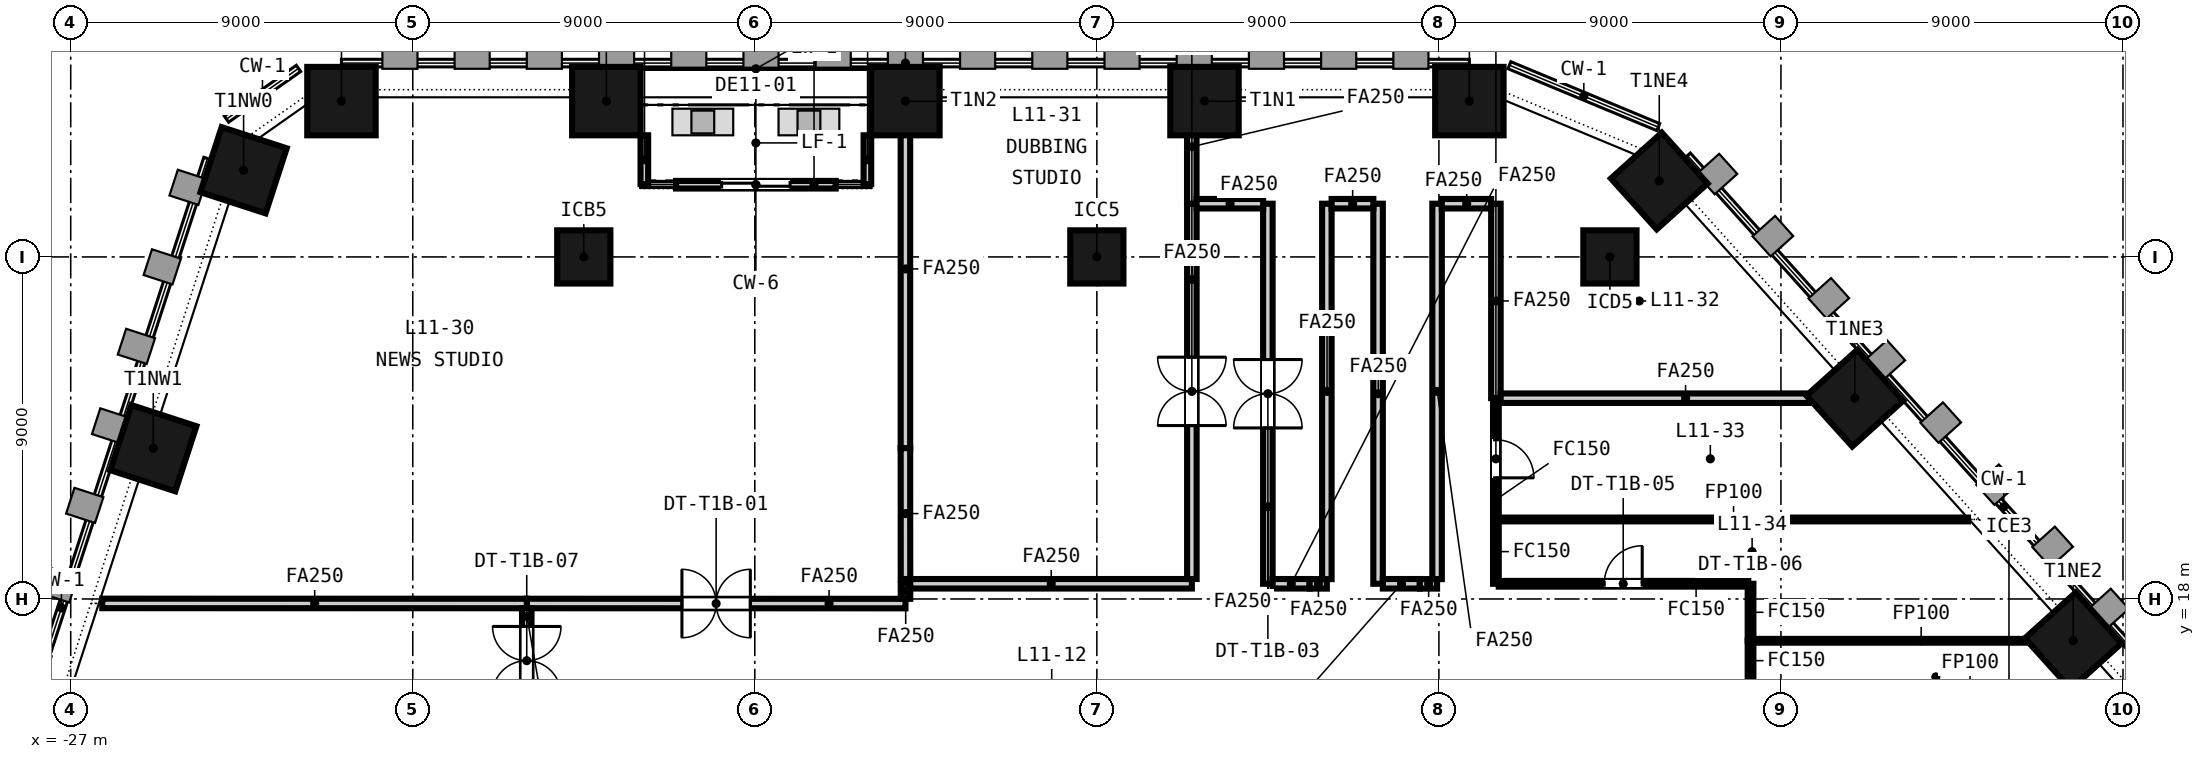
"""IFC4 building model, lengths in metres.
Left out: names, types, materials, properties, quantities, classifications, styles, units other than length and angle.
Written with IfcOpenShell. Run it as: python <this file> out.ifc"""

import sys

from ifc_helpers import new_model, si_unit, direction, frame, frame_2d, origin, origin_2d, place, context, subcontext, project, spatial, rectangle, extrude, element, fill, save


model = new_model("IFC4")
c1 = context("Model", 3, precision=1e-05, world=origin(), true_north=direction((0.0, 1.0)))
c2 = subcontext(c1, "Body", "Model", "MODEL_VIEW")
j1 = project(units=[si_unit("LENGTHUNIT", "METRE"), si_unit("PLANEANGLEUNIT", "RADIAN")], contexts=[c1])
p1 = place(None, origin())
s1 = spatial("IfcSite", under=j1, at=p1, CompositionType="ELEMENT")
p2 = place(p1, origin())
s2 = spatial("IfcBuilding", under=s1, at=p2, CompositionType="ELEMENT")
p3 = place(p2, frame((0.0, 0.0, 54.25)))
s3 = spatial("IfcBuildingStorey", under=s2, at=p3, CompositionType="ELEMENT", Elevation=54.25)
for number, where, z_axis, x_axis in (
    (1, (9.802, 31.1, -0.15), (0.0, 0.0, 1.0), (-1.0, 0.0, 0.0)),
    (2, (2.832, 31.1, -0.15), (0.0, 0.0, 1.0), (-1.0, 0.0, 0.0)),
    (3, (-5.037, 31.1, -0.15), (0.0, 0.0, 1.0), (-1.0, 0.0, 0.0)),
    (4, (-12.907, 31.1, -0.15), (0.0, 0.0, 1.0), (-1.0, 0.0, 0.0)),
    (5, (-19.876, 31.1, -0.15), (0.0, 0.0, 1.0), (-1.0, 0.0, 0.0)),
    (6, (-22.451, 29.281, -0.15), (0.0, 0.0, 1.0), (-0.309, -0.951, 0.0)),
    (7, (-24.827, 21.968, -0.15), (0.0, 0.0, 1.0), (-0.309, -0.951, 0.0)),
    (8, (25.691, 16.9, -0.15), (0.0, 0.0, 1.0), (-0.669, 0.743, 0.0)),
    (9, (19.944, 23.283, -0.15), (0.0, 0.0, 1.0), (-0.669, 0.743, 0.0)),
    (10, (14.799, 28.998, -0.15), (0.0, 0.0, 1.0), (-0.669, 0.743, 0.0)),
):
    element("IfcColumn", number, at=place(p3, frame(where, z_axis=z_axis, x_axis=x_axis)), inside=s3, PredefinedType="COLUMN", context=c2, shape_type="SweptSolid", body=[
        extrude(rectangle(XDim=1.8, YDim=1.8, at=origin_2d()), origin(), (0.0, 0.0, 1.0), 3.65),
    ])
for number, where, z_axis, x_axis in (
    (11, (-13.5, 27.0, -0.15), (0.0, 0.0, 1.0), (1.0, 0.0, 0.0)),
    (12, (0.0, 27.0, -0.15), (0.0, 0.0, 1.0), (1.0, 0.0, 0.0)),
    (13, (13.5, 27.0, -0.15), (0.0, 0.0, 1.0), (1.0, 0.0, 0.0)),
):
    element("IfcColumn", number, at=place(p3, frame(where, z_axis=z_axis, x_axis=x_axis)), inside=s3, PredefinedType="COLUMN", context=c2, shape_type="SweptSolid", body=[
        extrude(rectangle(XDim=1.4, YDim=1.4, at=origin_2d()), origin(), (0.0, 0.0, 1.0), 3.65),
    ])
p4 = place(p3, frame((-6.872, 28.9, 0.0), z_axis=(0.0, 0.0, 1.0), x_axis=(-1.0, 0.0, 0.0)))
e14 = element("IfcWall", 14, at=p4, inside=s3, PredefinedType="SOLIDWALL", context=c2, shape_type="SweptSolid", body=[
    extrude(rectangle(XDim=4.2, YDim=0.2, at=frame_2d((2.1, 0.0))), origin(), (0.0, 0.0, 1.0), 3.05),
])
p5 = place(p4, frame((1.2, 0.0, 0.0)))
e15 = element("IfcOpeningElement", 15, at=p5, cuts=e14, PredefinedType="OPENING", context=c2, shape_type="SweptSolid", body=[
    extrude(rectangle(XDim=1.8, YDim=2.4, at=frame_2d((0.9, 1.2))), frame((0.0, 0.11, 0.0), z_axis=(0.0, -1.0, 0.0), x_axis=(1.0, 0.0, 0.0)), (0.0, 0.0, 1.0), 0.22),
])
for number, where, z_axis, x_axis in (
    (16, (-6.037, 30.2, 0.0), (0.0, 0.0, 1.0), (0.0, -1.0, 0.0)),
    (17, (-11.907, 30.2, 0.0), (0.0, 0.0, 1.0), (0.0, -1.0, 0.0)),
):
    element("IfcWall", number, at=place(p3, frame(where, z_axis=z_axis, x_axis=x_axis)), inside=s3, PredefinedType="SOLIDWALL", context=c2, shape_type="SweptSolid", body=[
        extrude(rectangle(XDim=1.284, YDim=0.2, at=frame_2d((0.642, 0.0))), origin(), (0.0, 0.0, 1.0), 3.05),
    ])
p6 = place(p3, frame((4.5, 28.4, 0.0), z_axis=(0.0, 0.0, 1.0), x_axis=(0.0, -1.0, 0.0)))
e18 = element("IfcWall", 18, at=p6, inside=s3, PredefinedType="PARTITIONING", context=c2, shape_type="SweptSolid", body=[
    extrude(rectangle(XDim=10.0, YDim=0.25, at=frame_2d((5.0, 0.0))), origin(), (0.0, 0.0, 1.0), 2.741),
])
p7 = place(p6, frame((4.1, 0.0, 0.0)))
e19 = element("IfcOpeningElement", 19, at=p7, cuts=e18, PredefinedType="OPENING", context=c2, shape_type="SweptSolid", body=[
    extrude(rectangle(XDim=1.8, YDim=2.1, at=frame_2d((0.9, 1.05))), frame((0.0, 0.135, 0.0), z_axis=(0.0, -1.0, 0.0), x_axis=(1.0, 0.0, 0.0)), (0.0, 0.0, 1.0), 0.27),
])
p8 = place(p3, frame((7.4, 28.4, 0.0), z_axis=(0.0, 0.0, 1.0), x_axis=(0.0, -1.0, 0.0)))
e20 = element("IfcWall", 20, at=p8, inside=s3, PredefinedType="PARTITIONING", context=c2, shape_type="SweptSolid", body=[
    extrude(rectangle(XDim=10.0, YDim=0.25, at=frame_2d((5.0, 0.0))), origin(), (0.0, 0.0, 1.0), 2.741),
])
p9 = place(p3, frame((10.5, 28.4, 0.0), z_axis=(0.0, 0.0, 1.0), x_axis=(0.0, -1.0, 0.0)))
e21 = element("IfcWall", 21, at=p9, inside=s3, PredefinedType="PARTITIONING", context=c2, shape_type="SweptSolid", body=[
    extrude(rectangle(XDim=5.117, YDim=0.25, at=frame_2d((2.559, 0.0))), origin(), (0.0, 0.0, 1.0), 2.741),
])
p10 = place(p3, frame((10.5, 23.283, 0.0), z_axis=(0.0, 0.0, 1.0), x_axis=(0.0, -1.0, 0.0)))
e22 = element("IfcWall", 22, at=p10, inside=s3, PredefinedType="PARTITIONING", context=c2, shape_type="SweptSolid", body=[
    extrude(rectangle(XDim=3.191, YDim=0.15, at=frame_2d((1.595, 0.0))), origin(), (0.0, 0.0, 1.0), 2.741),
])
p11 = place(p10, frame((1.095, 0.0, 0.0)))
e23 = element("IfcOpeningElement", 23, at=p11, cuts=e22, PredefinedType="OPENING", context=c2, shape_type="SweptSolid", body=[
    extrude(rectangle(XDim=1.0, YDim=2.1, at=frame_2d((0.5, 1.05))), frame((0.0, 0.085, 0.0), z_axis=(0.0, -1.0, 0.0), x_axis=(1.0, 0.0, 0.0)), (0.0, 0.0, 1.0), 0.17),
])
p12 = place(p3, frame((10.5, 20.092, 0.0), z_axis=(0.0, 0.0, 1.0), x_axis=(0.0, -1.0, 0.0)))
e24 = element("IfcWall", 24, at=p12, inside=s3, PredefinedType="PARTITIONING", context=c2, shape_type="SweptSolid", body=[
    extrude(rectangle(XDim=1.692, YDim=0.15, at=frame_2d((0.846, 0.0))), origin(), (0.0, 0.0, 1.0), 2.741),
])
p13 = place(p3, frame((17.2, 18.4, 0.0), z_axis=(0.0, 0.0, 1.0), x_axis=(0.0, -1.0, 0.0)))
e25 = element("IfcWall", 25, at=p13, inside=s3, PredefinedType="PARTITIONING", context=c2, shape_type="SweptSolid", body=[
    extrude(rectangle(XDim=1.5, YDim=0.15, at=frame_2d((0.75, 0.0))), origin(), (0.0, 0.0, 1.0), 2.741),
])
p14 = place(p3, frame((17.2, 16.9, 0.0), z_axis=(0.0, 0.0, 1.0), x_axis=(0.0, -1.0, 0.0)))
e26 = element("IfcWall", 26, at=p14, inside=s3, PredefinedType="PARTITIONING", context=c2, shape_type="SweptSolid", body=[
    extrude(rectangle(XDim=3.191, YDim=0.15, at=frame_2d((1.595, 0.0))), origin(), (0.0, 0.0, 1.0), 2.741),
])
p15 = place(p14, frame((1.095, 0.0, 0.0)))
e27 = element("IfcOpeningElement", 27, at=p15, cuts=e26, PredefinedType="OPENING", context=c2, shape_type="SweptSolid", body=[
    extrude(rectangle(XDim=1.0, YDim=2.1, at=frame_2d((0.5, 1.05))), frame((0.0, 0.085, 0.0), z_axis=(0.0, -1.0, 0.0), x_axis=(1.0, 0.0, 0.0)), (0.0, 0.0, 1.0), 0.17),
])
p16 = place(p3, frame((-15.0, 17.881, 0.0), z_axis=(0.0, 0.0, 1.0), x_axis=(0.999999975691, -0.000220496356, 0.0)))
e28 = element("IfcWall", 28, at=p16, inside=s3, PredefinedType="PARTITIONING", context=c2, shape_type="SweptSolid", body=[
    extrude(rectangle(XDim=9.965, YDim=0.25, at=frame_2d((4.982, 0.0))), origin(), (0.0, 0.0, 1.0), 2.741),
])
p17 = place(p16, frame((4.083, 0.0, 0.0)))
e29 = element("IfcOpeningElement", 29, at=p17, cuts=e28, PredefinedType="OPENING", context=c2, shape_type="SweptSolid", body=[
    extrude(rectangle(XDim=1.8, YDim=2.1, at=frame_2d((0.9, 1.05))), frame((0.0, 0.135, 0.0), z_axis=(0.0, -1.0, 0.0), x_axis=(1.0, 0.0, 0.0)), (0.0, 0.0, 1.0), 0.27),
])
p18 = place(p3, frame((-5.035, 18.004, 0.0), z_axis=(0.0, 0.0, 1.0), x_axis=(0.0, 1.0, 0.0)))
e30 = element("IfcWall", 30, at=p18, inside=s3, PredefinedType="PARTITIONING", context=c2, shape_type="SweptSolid", body=[
    extrude(rectangle(XDim=0.396, YDim=0.25, at=frame_2d((0.198, 0.0))), origin(), (0.0, 0.0, 1.0), 2.741),
])
p19 = place(p3, frame((-5.037, 21.968, 0.0), z_axis=(0.0, 0.0, 1.0), x_axis=(0.0, 1.0, 0.0)))
e31 = element("IfcWall", 31, at=p19, inside=s3, PredefinedType="PARTITIONING", context=c2, shape_type="SweptSolid", body=[
    extrude(rectangle(XDim=9.432, YDim=0.25, at=frame_2d((4.716, 0.0))), origin(), (0.0, 0.0, 1.0), 2.741),
])
p20 = place(p3, frame((-26.17, 17.883, 0.0), z_axis=(0.0, 0.0, 1.0), x_axis=(0.999999988296, -0.000152998774, 0.0)))
e32 = element("IfcWall", 32, at=p20, inside=s3, PredefinedType="PARTITIONING", context=c2, shape_type="SweptSolid", body=[
    extrude(rectangle(XDim=11.17, YDim=0.25, at=frame_2d((5.585, 0.0))), origin(), (0.0, 0.0, 1.0), 2.741),
])
p21 = place(p3, frame((-4.91, 18.4, 0.0), z_axis=(0.0, 0.0, 1.0), x_axis=(1.0, 0.0, 0.0)))
e33 = element("IfcWall", 33, at=p21, inside=s3, PredefinedType="PARTITIONING", context=c2, shape_type="SweptSolid", body=[
    extrude(rectangle(XDim=7.41, YDim=0.25, at=frame_2d((3.705, 0.0))), origin(), (0.0, 0.0, 1.0), 2.741),
])
p22 = place(p3, frame((2.5, 18.525, 0.0), z_axis=(0.0, 0.0, 1.0), x_axis=(0.0, 1.0, 0.0)))
e34 = element("IfcWall", 34, at=p22, inside=s3, PredefinedType="PARTITIONING", context=c2, shape_type="SweptSolid", body=[
    extrude(rectangle(XDim=9.875, YDim=0.25, at=frame_2d((4.938, 0.0))), origin(), (0.0, 0.0, 1.0), 2.741),
])
p23 = place(p22, frame((4.038, 0.0, 0.0)))
e35 = element("IfcOpeningElement", 35, at=p23, cuts=e34, PredefinedType="OPENING", context=c2, shape_type="SweptSolid", body=[
    extrude(rectangle(XDim=1.8, YDim=2.1, at=frame_2d((0.9, 1.05))), frame((0.0, 0.135, 0.0), z_axis=(0.0, -1.0, 0.0), x_axis=(1.0, 0.0, 0.0)), (0.0, 0.0, 1.0), 0.27),
])
p24 = place(p3, frame((-5.037, 21.968, 0.0), z_axis=(0.0, 0.0, 1.0), x_axis=(0.000567255103, -0.999999839111, 0.0)))
e36 = element("IfcWall", 36, at=p24, inside=s3, PredefinedType="PARTITIONING", context=c2, shape_type="SweptSolid", body=[
    extrude(rectangle(XDim=3.443, YDim=0.25, at=frame_2d((1.722, 0.0))), origin(), (0.0, 0.0, 1.0), 2.741),
])
p25 = place(p3, frame((2.498, 28.4, 0.0), z_axis=(0.0, 0.0, 1.0), x_axis=(0.0, 1.0, 0.0)))
e37 = element("IfcWall", 37, at=p25, inside=s3, PredefinedType="PARTITIONING", context=c2, shape_type="SweptSolid", body=[
    extrude(rectangle(XDim=3.0, YDim=0.25, at=frame_2d((1.5, 0.0))), origin(), (0.0, 0.0, 1.0), 2.741),
])
p26 = place(p3, frame((2.625, 28.4, 0.0), z_axis=(0.0, 0.0, 1.0), x_axis=(1.0, 0.0, 0.0)))
e38 = element("IfcWall", 38, at=p26, inside=s3, PredefinedType="PARTITIONING", context=c2, shape_type="SweptSolid", body=[
    extrude(rectangle(XDim=1.75, YDim=0.25, at=frame_2d((0.875, 0.0))), origin(), (0.0, 0.0, 1.0), 2.741),
])
p27 = place(p3, frame((4.625, 18.4, 0.0), z_axis=(0.0, 0.0, 1.0), x_axis=(1.0, 0.0, 0.0)))
e39 = element("IfcWall", 39, at=p27, inside=s3, PredefinedType="PARTITIONING", context=c2, shape_type="SweptSolid", body=[
    extrude(rectangle(XDim=0.973, YDim=0.25, at=frame_2d((0.486, 0.0))), origin(), (0.0, 0.0, 1.0), 2.741),
])
p28 = place(p3, frame((5.598, 18.398, 0.0), z_axis=(0.0, 0.0, 1.0), x_axis=(1.0, 0.0, 0.0)))
e40 = element("IfcWall", 40, at=p28, inside=s3, PredefinedType="PARTITIONING", context=c2, shape_type="SweptSolid", body=[
    extrude(rectangle(XDim=0.454, YDim=0.25, at=frame_2d((0.227, 0.0))), origin(), (0.0, 0.0, 1.0), 2.741),
])
p29 = place(p3, frame((6.052, 18.523, 0.0), z_axis=(0.0, 0.0, 1.0), x_axis=(0.0, 1.0, 0.0)))
e41 = element("IfcWall", 41, at=p29, inside=s3, PredefinedType="PARTITIONING", context=c2, shape_type="SweptSolid", body=[
    extrude(rectangle(XDim=9.877, YDim=0.25, at=frame_2d((4.938, 0.0))), origin(), (0.0, 0.0, 1.0), 2.741),
])
p30 = place(p3, frame((6.177, 28.4, 0.0), z_axis=(0.0, 0.0, 1.0), x_axis=(1.0, 0.0, 0.0)))
e42 = element("IfcWall", 42, at=p30, inside=s3, PredefinedType="PARTITIONING", context=c2, shape_type="SweptSolid", body=[
    extrude(rectangle(XDim=1.098, YDim=0.25, at=frame_2d((0.549, 0.0))), origin(), (0.0, 0.0, 1.0), 2.741),
])
p31 = place(p3, frame((7.525, 18.4, 0.0), z_axis=(0.0, 0.0, 1.0), x_axis=(1.0, 0.0, 0.0)))
e43 = element("IfcWall", 43, at=p31, inside=s3, PredefinedType="PARTITIONING", context=c2, shape_type="SweptSolid", body=[
    extrude(rectangle(XDim=0.973, YDim=0.25, at=frame_2d((0.487, 0.0))), origin(), (0.0, 0.0, 1.0), 2.741),
])
p32 = place(p3, frame((8.498, 18.398, 0.0), z_axis=(0.0, 0.0, 1.0), x_axis=(1.0, 0.0, 0.0)))
e44 = element("IfcWall", 44, at=p32, inside=s3, PredefinedType="PARTITIONING", context=c2, shape_type="SweptSolid", body=[
    extrude(rectangle(XDim=0.454, YDim=0.25, at=frame_2d((0.227, 0.0))), origin(), (0.0, 0.0, 1.0), 2.741),
])
p33 = place(p3, frame((8.952, 18.523, 0.0), z_axis=(0.0, 0.0, 1.0), x_axis=(0.0, 1.0, 0.0)))
e45 = element("IfcWall", 45, at=p33, inside=s3, PredefinedType="PARTITIONING", context=c2, shape_type="SweptSolid", body=[
    extrude(rectangle(XDim=9.877, YDim=0.25, at=frame_2d((4.938, 0.0))), origin(), (0.0, 0.0, 1.0), 2.741),
])
p34 = place(p3, frame((9.077, 28.4, 0.0), z_axis=(0.0, 0.0, 1.0), x_axis=(1.0, 0.0, 0.0)))
e46 = element("IfcWall", 46, at=p34, inside=s3, PredefinedType="PARTITIONING", context=c2, shape_type="SweptSolid", body=[
    extrude(rectangle(XDim=1.298, YDim=0.25, at=frame_2d((0.649, 0.0))), origin(), (0.0, 0.0, 1.0), 2.741),
])
p35 = place(p3, frame((10.625, 23.283, 0.0), z_axis=(0.0, 0.0, 1.0), x_axis=(1.0, 0.0, 0.0)))
e47 = element("IfcWall", 47, at=p35, inside=s3, PredefinedType="PARTITIONING", context=c2, shape_type="SweptSolid", body=[
    extrude(rectangle(XDim=9.722, YDim=0.25, at=frame_2d((4.861, 0.0))), origin(), (0.0, 0.0, 1.0), 2.741),
])
p36 = place(p3, frame((10.575, 20.092, 0.0), z_axis=(0.0, 0.0, 1.0), x_axis=(1.0, 0.0, 0.0)))
e48 = element("IfcWall", 48, at=p36, inside=s3, PredefinedType="PARTITIONING", context=c2, shape_type="SweptSolid", body=[
    extrude(rectangle(XDim=12.346, YDim=0.1, at=frame_2d((6.173, 0.0))), origin(), (0.0, 0.0, 1.0), 2.741),
])
p37 = place(p3, frame((10.575, 18.4, 0.0), z_axis=(0.0, 0.0, 1.0), x_axis=(1.0, 0.0, 0.0)))
e49 = element("IfcWall", 49, at=p37, inside=s3, PredefinedType="PARTITIONING", context=c2, shape_type="SweptSolid", body=[
    extrude(rectangle(XDim=6.55, YDim=0.15, at=frame_2d((3.275, 0.0))), origin(), (0.0, 0.0, 1.0), 2.741),
])
p38 = place(p37, frame((2.775, 0.0, 0.0)))
e50 = element("IfcOpeningElement", 50, at=p38, cuts=e49, PredefinedType="OPENING", context=c2, shape_type="SweptSolid", body=[
    extrude(rectangle(XDim=1.0, YDim=2.1, at=frame_2d((0.5, 1.05))), frame((0.0, 0.085, 0.0), z_axis=(0.0, -1.0, 0.0), x_axis=(1.0, 0.0, 0.0)), (0.0, 0.0, 1.0), 0.17),
])
p39 = place(p3, frame((17.275, 16.9, 0.0), z_axis=(0.0, 0.0, 1.0), x_axis=(1.0, 0.0, 0.0)))
e51 = element("IfcWall", 51, at=p39, inside=s3, PredefinedType="PARTITIONING", context=c2, shape_type="SweptSolid", body=[
    extrude(rectangle(XDim=8.82, YDim=0.1, at=frame_2d((4.41, 0.0))), origin(), (0.0, 0.0, 1.0), 2.741),
])
p40 = place(p3, frame((-15.002, 14.998, 0.0), z_axis=(0.0, 0.0, 1.0), x_axis=(0.000708152429, 0.99999974926, 0.0)))
e52 = element("IfcWall", 52, at=p40, inside=s3, PredefinedType="PARTITIONING", context=c2, shape_type="SweptSolid", body=[
    extrude(rectangle(XDim=2.758, YDim=0.25, at=frame_2d((1.379, 0.0))), origin(), (0.0, 0.0, 1.0), 2.741),
])
p41 = place(p40, frame((0.479, 0.0, 0.0)))
e53 = element("IfcOpeningElement", 53, at=p41, cuts=e52, PredefinedType="OPENING", context=c2, shape_type="SweptSolid", body=[
    extrude(rectangle(XDim=1.8, YDim=2.1, at=frame_2d((0.9, 1.05))), frame((0.0, 0.135, 0.0), z_axis=(0.0, -1.0, 0.0), x_axis=(1.0, 0.0, 0.0)), (0.0, 0.0, 1.0), 0.27),
])
p42 = place(p5, origin())
e54 = element("IfcDoor", 54, at=p42, inside=s3, OperationType="SINGLE_SWING_LEFT", PredefinedType="DOOR", context=c2, shape_type="SweptSolid", body=[
    extrude(rectangle(XDim=1.8, YDim=2.4, at=frame_2d((0.9, 1.2))), frame((0.0, 0.025, 0.0), z_axis=(0.0, -1.0, 0.0), x_axis=(1.0, 0.0, 0.0)), (0.0, 0.0, 1.0), 0.05),
])
fill(e15, e54)
p43 = place(p17, origin())
e55 = element("IfcDoor", 55, at=p43, inside=s3, OperationType="DOUBLE_DOOR_DOUBLE_SWING", PredefinedType="DOOR", context=c2, shape_type="SweptSolid", body=[
    extrude(rectangle(XDim=1.8, YDim=2.1, at=frame_2d((0.9, 1.05))), frame((0.0, 0.025, 0.0), z_axis=(0.0, -1.0, 0.0), x_axis=(1.0, 0.0, 0.0)), (0.0, 0.0, 1.0), 0.05),
])
fill(e29, e55)
p44 = place(p23, origin())
e56 = element("IfcDoor", 56, at=p44, inside=s3, OperationType="DOUBLE_DOOR_DOUBLE_SWING", PredefinedType="DOOR", context=c2, shape_type="SweptSolid", body=[
    extrude(rectangle(XDim=1.8, YDim=2.1, at=frame_2d((0.9, 1.05))), frame((0.0, 0.025, 0.0), z_axis=(0.0, -1.0, 0.0), x_axis=(1.0, 0.0, 0.0)), (0.0, 0.0, 1.0), 0.05),
])
fill(e35, e56)
p45 = place(p7, origin())
e57 = element("IfcDoor", 57, at=p45, inside=s3, OperationType="DOUBLE_DOOR_DOUBLE_SWING", PredefinedType="DOOR", context=c2, shape_type="SweptSolid", body=[
    extrude(rectangle(XDim=1.8, YDim=2.1, at=frame_2d((0.9, 1.05))), frame((0.0, 0.025, 0.0), z_axis=(0.0, -1.0, 0.0), x_axis=(1.0, 0.0, 0.0)), (0.0, 0.0, 1.0), 0.05),
])
fill(e19, e57)
p46 = place(p11, origin())
e58 = element("IfcDoor", 58, at=p46, inside=s3, OperationType="SINGLE_SWING_RIGHT", PredefinedType="DOOR", context=c2, shape_type="SweptSolid", body=[
    extrude(rectangle(XDim=1.0, YDim=2.1, at=frame_2d((0.5, 1.05))), frame((0.0, 0.025, 0.0), z_axis=(0.0, -1.0, 0.0), x_axis=(1.0, 0.0, 0.0)), (0.0, 0.0, 1.0), 0.05),
])
fill(e23, e58)
p47 = place(p38, origin())
e59 = element("IfcDoor", 59, at=p47, inside=s3, OperationType="SINGLE_SWING_RIGHT", PredefinedType="DOOR", context=c2, shape_type="SweptSolid", body=[
    extrude(rectangle(XDim=1.0, YDim=2.1, at=frame_2d((0.5, 1.05))), frame((0.0, 0.025, 0.0), z_axis=(0.0, -1.0, 0.0), x_axis=(1.0, 0.0, 0.0)), (0.0, 0.0, 1.0), 0.05),
])
fill(e50, e59)
p48 = place(p41, origin())
e60 = element("IfcDoor", 60, at=p48, inside=s3, OperationType="DOUBLE_DOOR_DOUBLE_SWING", PredefinedType="DOOR", context=c2, shape_type="SweptSolid", body=[
    extrude(rectangle(XDim=1.8, YDim=2.1, at=frame_2d((0.9, 1.05))), frame((0.0, 0.025, 0.0), z_axis=(0.0, -1.0, 0.0), x_axis=(1.0, 0.0, 0.0)), (0.0, 0.0, 1.0), 0.05),
])
fill(e53, e60)
save(model, sys.argv[1])
